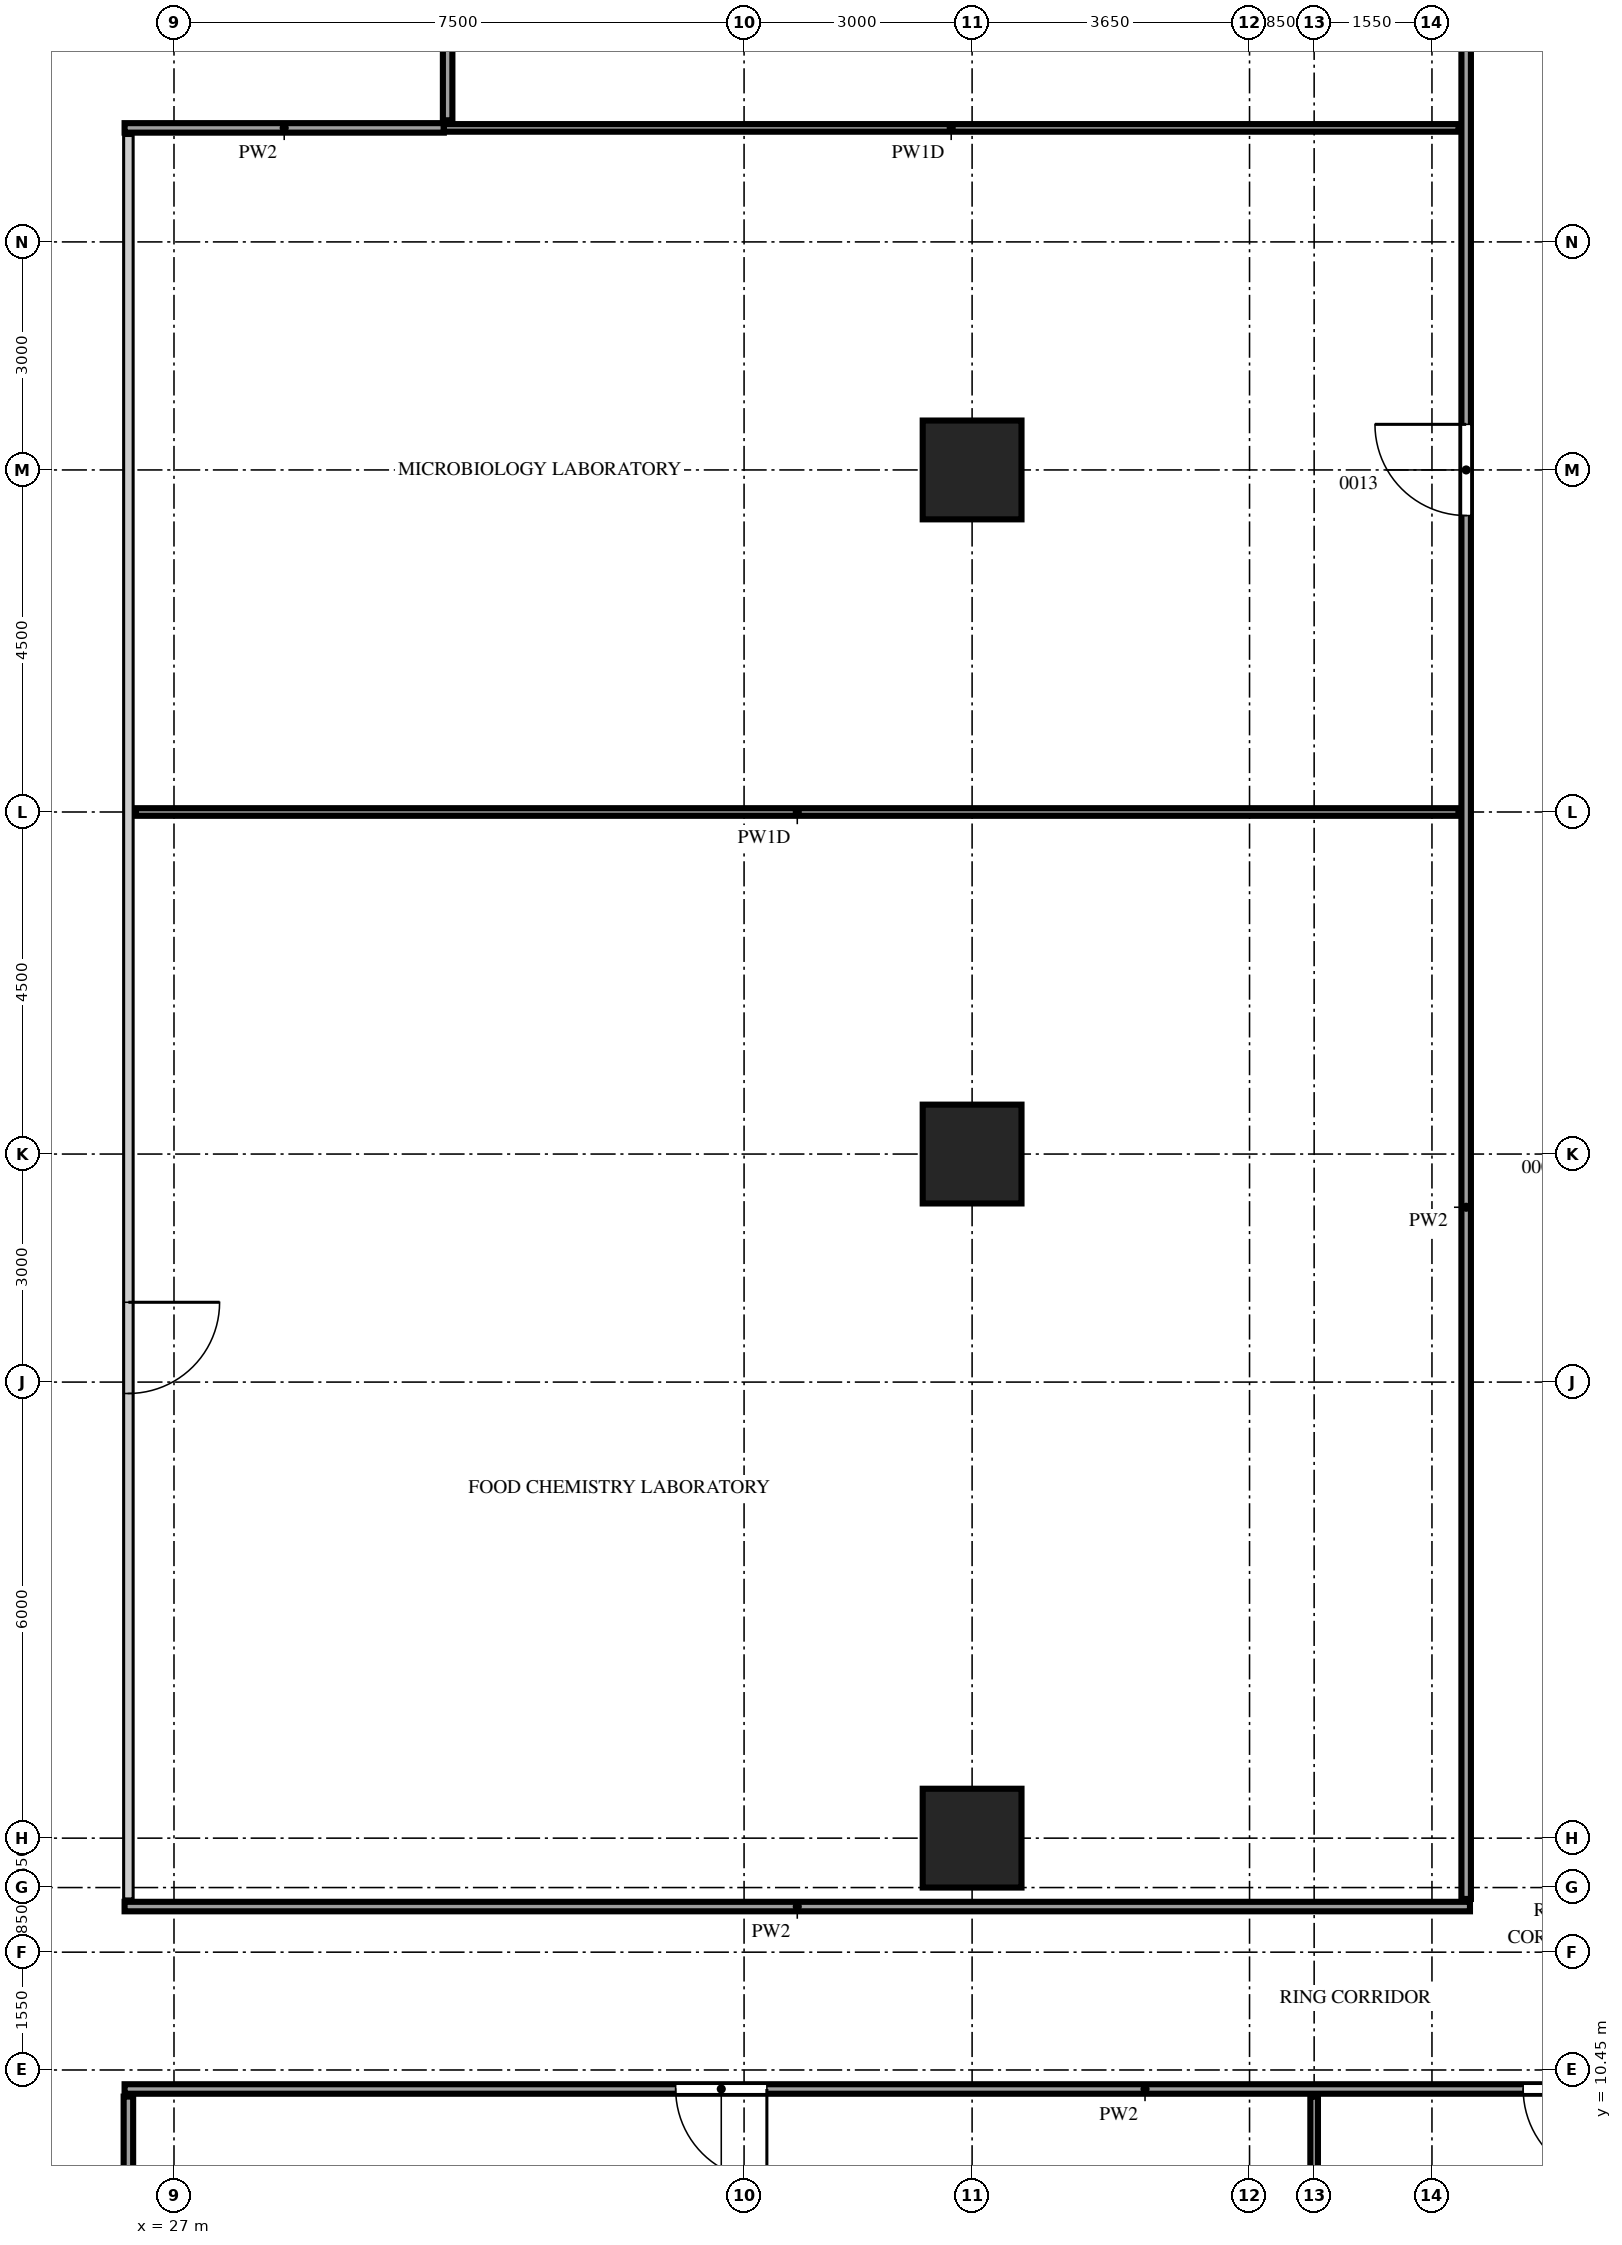
"""IFC4 building model, lengths in metres.
Left out: names, types, materials, properties, quantities, classifications, styles, units other than length and angle.
Written with IfcOpenShell. Run it as: python <this file> out.ifc"""

import sys

from ifc_helpers import new_model, si_unit, direction, frame, frame_2d, origin, origin_2d, place, context, subcontext, project, spatial, rectangle, extrude, source, transform, mapped, element, fill, save


model = new_model("IFC4")
c1 = context("Model", 3, precision=1e-05, world=origin(), true_north=direction((0.0, 1.0)))
c2 = subcontext(c1, "Body", "Model", "MODEL_VIEW")
j1 = project(units=[si_unit("LENGTHUNIT", "METRE"), si_unit("PLANEANGLEUNIT", "RADIAN")], contexts=[c1])
p1 = place(None, origin())
s1 = spatial("IfcSite", under=j1, at=p1, CompositionType="ELEMENT")
p2 = place(p1, origin())
s2 = spatial("IfcBuilding", under=s1, at=p2, CompositionType="ELEMENT")
p3 = place(p2, frame((0.0, 0.0, 123.5)))
s3 = spatial("IfcBuildingStorey", under=s2, at=p3, CompositionType="ELEMENT", Elevation=123.5)
m1 = source(origin(), c2, "Body", "SweptSolid", [
    extrude(rectangle(XDim=1.3, YDim=1.3, at=origin_2d()), origin(), (0.0, 0.0, 1.0), 4.1),
])
for number, where, z_axis, x_axis in (
    (1, (37.5, 13.5, 0.0), (0.0, 0.0, 1.0), (1.0, 0.0, 0.0)),
    (2, (37.5, 22.5, 0.0), (0.0, 0.0, 1.0), (1.0, 0.0, 0.0)),
    (3, (37.5, 31.5, 0.0), (0.0, 0.0, 1.0), (1.0, 0.0, 0.0)),
):
    element("IfcColumn", number, at=place(p3, frame(where, z_axis=z_axis, x_axis=x_axis)), inside=s3, PredefinedType="COLUMN", context=c2, shape_type="MappedRepresentation", body=[
        mapped(m1, transform((0.0, 0.0, 0.0))),
    ])
m2 = source(origin(), c2, "Body", "SweptSolid", [
    extrude(rectangle(XDim=8.45, YDim=0.1, at=frame_2d((4.225, 0.0))), origin(), (0.0, 0.0, 1.0), 3.6),
])
p4 = place(p3, frame((42.0, 1.65, 0.0), z_axis=(0.0, 0.0, 1.0), x_axis=(0.0, 1.0, 0.0)))
e4 = element("IfcWall", 4, at=p4, inside=s3, PredefinedType="PARTITIONING", context=c2, shape_type="MappedRepresentation", body=[
    mapped(m2, transform((0.0, 0.0, 0.0))),
])
m3 = source(origin(), c2, "Body", "SweptSolid", [
    extrude(rectangle(XDim=3.95, YDim=0.125, at=frame_2d((1.975, 0.0))), origin(), (0.0, 0.0, 1.0), 4.2),
])
p5 = place(p3, frame((26.4, 6.15, 0.0), z_axis=(0.0, 0.0, 1.0), x_axis=(0.0, 1.0, 0.0)))
e5 = element("IfcWall", 5, at=p5, inside=s3, PredefinedType="PARTITIONING", context=c2, shape_type="MappedRepresentation", body=[
    mapped(m3, transform((0.0, 0.0, 0.0))),
])
m4 = source(origin(), c2, "Body", "SweptSolid", [
    extrude(rectangle(XDim=20.0, YDim=0.125, at=frame_2d((10.0, 0.0))), origin(), (0.0, 0.0, 1.0), 4.2),
])
p6 = place(p3, frame((26.35, 10.2, 0.0), z_axis=(0.0, 0.0, 1.0), x_axis=(1.0, 0.0, 0.0)))
e6 = element("IfcWall", 6, at=p6, inside=s3, PredefinedType="PARTITIONING", context=c2, shape_type="MappedRepresentation", body=[
    mapped(m4, transform((0.0, 0.0, 0.0))),
])
m5 = source(origin(), c2, "Body", "SweptSolid", [
    extrude(rectangle(XDim=1.2, YDim=2.1, at=frame_2d((0.6, 1.05))), frame((0.0, 0.073, 0.0), z_axis=(0.0, -1.0, 0.0), x_axis=(1.0, 0.0, 0.0)), (0.0, 0.0, 1.0), 0.145),
])
p7 = place(p6, frame((7.25, 0.0, 0.0)))
e7 = element("IfcOpeningElement", 7, at=p7, cuts=e6, PredefinedType="OPENING", context=c2, shape_type="MappedRepresentation", body=[
    mapped(m5, transform((0.0, 0.0, 0.0))),
])
p8 = place(p6, frame((18.4, 0.0, 0.0)))
e8 = element("IfcOpeningElement", 8, at=p8, cuts=e6, PredefinedType="OPENING", context=c2, shape_type="MappedRepresentation", body=[
    mapped(m5, transform((0.0, 0.0, 0.0))),
])
m6 = source(origin(), c2, "Body", "SweptSolid", [
    extrude(rectangle(XDim=17.7, YDim=0.125, at=frame_2d((8.85, 0.0))), origin(), (0.0, 0.0, 1.0), 4.2),
])
p9 = place(p3, frame((26.35, 12.6, 0.0), z_axis=(0.0, 0.0, 1.0), x_axis=(1.0, 0.0, 0.0)))
e9 = element("IfcWall", 9, at=p9, inside=s3, PredefinedType="PARTITIONING", context=c2, shape_type="MappedRepresentation", body=[
    mapped(m6, transform((0.0, 0.0, 0.0))),
])
m7 = source(origin(), c2, "Body", "SweptSolid", [
    extrude(rectangle(XDim=23.2, YDim=0.125, at=frame_2d((11.6, 0.0))), origin(), (0.0, 0.0, 1.0), 4.2),
])
p10 = place(p3, frame((26.4, 12.7, 0.0), z_axis=(0.0, 0.0, 1.0), x_axis=(0.0, 1.0, 0.0)))
e10 = element("IfcWall", 10, at=p10, inside=s3, PredefinedType="PARTITIONING", context=c2, shape_type="MappedRepresentation", body=[
    mapped(m7, transform((0.0, 0.0, 0.0))),
])
p11 = place(p10, frame((6.65, 0.0, 0.0)))
e11 = element("IfcOpeningElement", 11, at=p11, cuts=e10, PredefinedType="OPENING", context=c2, shape_type="MappedRepresentation", body=[
    mapped(m5, transform((0.0, 0.0, 0.0))),
])
m8 = source(origin(), c2, "Body", "SweptSolid", [
    extrude(rectangle(XDim=32.85, YDim=0.125, at=frame_2d((16.425, 0.0))), origin(), (0.0, 0.0, 1.0), 4.2),
])
p12 = place(p3, frame((44.0, 12.7, 0.0), z_axis=(0.0, 0.0, 1.0), x_axis=(0.0, 1.0, 0.0)))
e12 = element("IfcWall", 12, at=p12, inside=s3, PredefinedType="PARTITIONING", context=c2, shape_type="MappedRepresentation", body=[
    mapped(m8, transform((0.0, 0.0, 0.0))),
])
p13 = place(p12, frame((18.2, 0.0, 0.0)))
e13 = element("IfcOpeningElement", 13, at=p13, cuts=e12, PredefinedType="OPENING", context=c2, shape_type="MappedRepresentation", body=[
    mapped(m5, transform((0.0, 0.0, 0.0))),
])
p14 = place(p12, frame((27.5, 0.0, 0.0)))
e14 = element("IfcOpeningElement", 14, at=p14, cuts=e12, PredefinedType="OPENING", context=c2, shape_type="MappedRepresentation", body=[
    mapped(m5, transform((0.0, 0.0, 0.0))),
])
m9 = source(origin(), c2, "Body", "SweptSolid", [
    extrude(rectangle(XDim=17.4, YDim=0.1, at=frame_2d((8.7, 0.0))), origin(), (0.0, 0.0, 1.0), 4.2),
])
p15 = place(p3, frame((26.5, 27.0, 0.0), z_axis=(0.0, 0.0, 1.0), x_axis=(1.0, 0.0, 0.0)))
e15 = element("IfcWall", 15, at=p15, inside=s3, PredefinedType="PARTITIONING", context=c2, shape_type="MappedRepresentation", body=[
    mapped(m9, transform((0.0, 0.0, 0.0))),
])
m10 = source(origin(), c2, "Body", "SweptSolid", [
    extrude(rectangle(XDim=4.2, YDim=0.125, at=frame_2d((2.1, 0.0))), origin(), (0.0, 0.0, 1.0), 4.2),
])
p16 = place(p3, frame((26.35, 36.0, 0.0), z_axis=(0.0, 0.0, 1.0), x_axis=(1.0, 0.0, 0.0)))
e16 = element("IfcWall", 16, at=p16, inside=s3, PredefinedType="PARTITIONING", context=c2, shape_type="MappedRepresentation", body=[
    mapped(m10, transform((0.0, 0.0, 0.0))),
])
m11 = source(origin(), c2, "Body", "SweptSolid", [
    extrude(rectangle(XDim=13.35, YDim=0.1, at=frame_2d((6.675, 0.0))), origin(), (0.0, 0.0, 1.0), 4.2),
])
p17 = place(p3, frame((30.55, 36.0, 0.0), z_axis=(0.0, 0.0, 1.0), x_axis=(1.0, 0.0, 0.0)))
e17 = element("IfcWall", 17, at=p17, inside=s3, PredefinedType="PARTITIONING", context=c2, shape_type="MappedRepresentation", body=[
    mapped(m11, transform((0.0, 0.0, 0.0))),
])
m12 = source(origin(), c2, "Body", "SweptSolid", [
    extrude(rectangle(XDim=9.45, YDim=0.125, at=frame_2d((4.725, 0.0))), origin(), (0.0, 0.0, 1.0), 4.2),
])
p18 = place(p3, frame((30.6, 36.1, 0.0), z_axis=(0.0, 0.0, 1.0), x_axis=(0.0, 1.0, 0.0)))
e18 = element("IfcWall", 18, at=p18, inside=s3, PredefinedType="PARTITIONING", context=c2, shape_type="MappedRepresentation", body=[
    mapped(m12, transform((0.0, 0.0, 0.0))),
])
m13 = source(origin(), c2, "Body", "SweptSolid", [
    extrude(rectangle(XDim=1.2, YDim=2.1, at=frame_2d((0.6, 1.05))), frame((0.0, 0.025, 0.0), z_axis=(0.0, -1.0, 0.0), x_axis=(1.0, 0.0, 0.0)), (0.0, 0.0, 1.0), 0.05),
])
p19 = place(p7, origin())
e19 = element("IfcDoor", 19, at=p19, inside=s3, OperationType="SINGLE_SWING_RIGHT", PredefinedType="DOOR", context=c2, shape_type="MappedRepresentation", body=[
    mapped(m13, transform((0.0, 0.0, 0.0))),
])
fill(e7, e19)
p20 = place(p8, origin())
e20 = element("IfcDoor", 20, at=p20, inside=s3, OperationType="SINGLE_SWING_RIGHT", PredefinedType="DOOR", context=c2, shape_type="MappedRepresentation", body=[
    mapped(m13, transform((0.0, 0.0, 0.0))),
])
fill(e8, e20)
p21 = place(p11, origin())
e21 = element("IfcDoor", 21, at=p21, inside=s3, OperationType="SINGLE_SWING_RIGHT", PredefinedType="DOOR", context=c2, shape_type="MappedRepresentation", body=[
    mapped(m13, transform((0.0, 0.0, 0.0))),
])
fill(e11, e21)
p22 = place(p13, origin())
e22 = element("IfcDoor", 22, at=p22, inside=s3, OperationType="SINGLE_SWING_LEFT", PredefinedType="DOOR", context=c2, shape_type="MappedRepresentation", body=[
    mapped(m13, transform((0.0, 0.0, 0.0))),
])
fill(e13, e22)
save(model, sys.argv[1])
